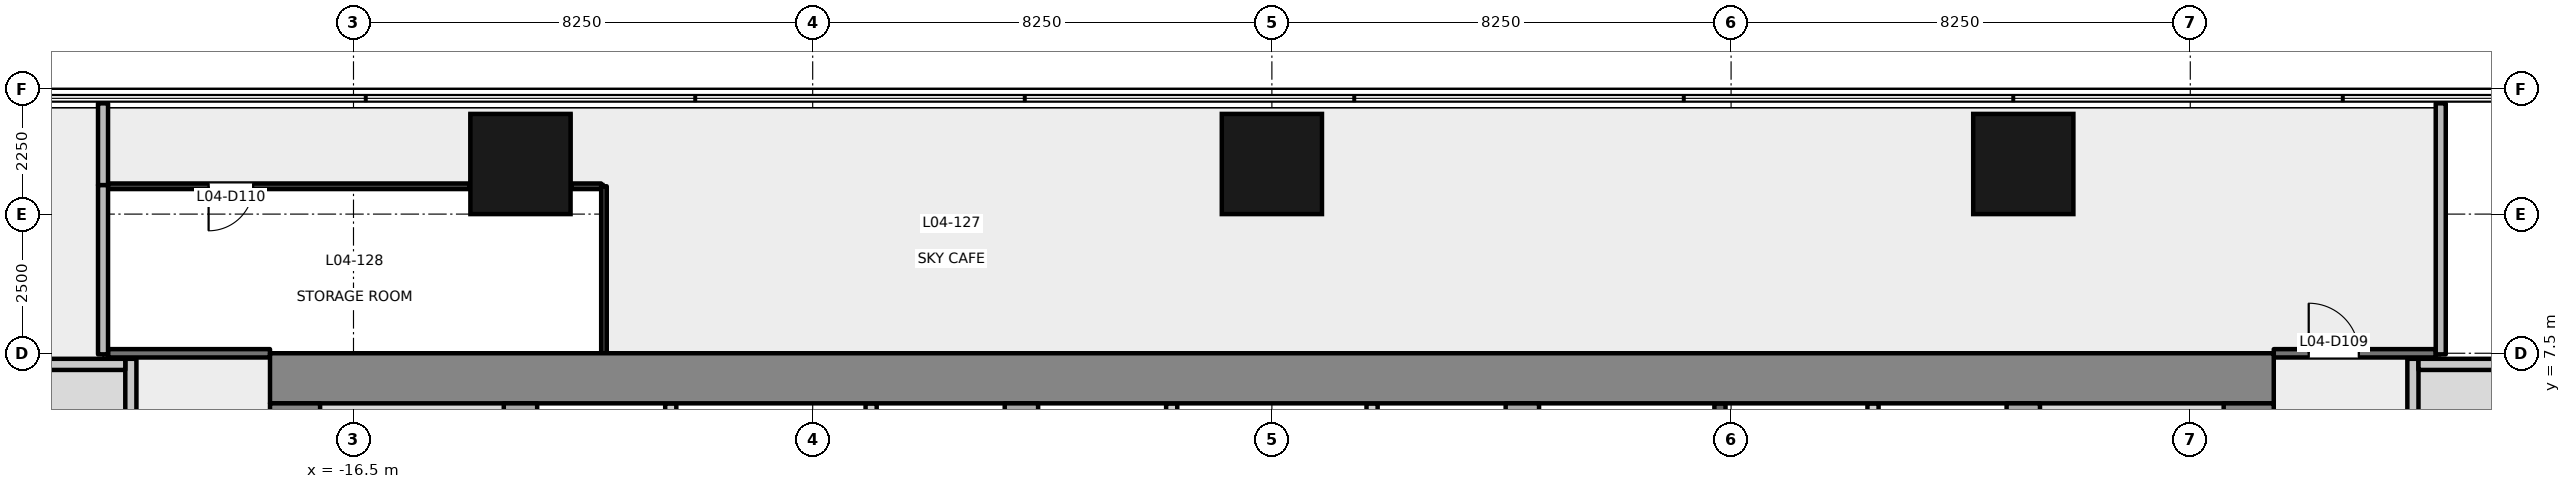
"""IFC4 building model, lengths in metres.
Left out: names, types, materials, properties, quantities, classifications, styles, units other than length and angle.
Written with IfcOpenShell. Run it as: python <this file> out.ifc"""

import sys

from ifc_helpers import new_model, si_unit, direction, frame, frame_2d, origin, origin_2d, place, context, subcontext, project, spatial, rectangle, extrude, element, fill, save


model = new_model("IFC4")
c1 = context("Model", 3, precision=1e-05, world=origin(), true_north=direction((0.0, 1.0)))
c2 = subcontext(c1, "Body", "Model", "MODEL_VIEW")
j1 = project(units=[si_unit("LENGTHUNIT", "METRE"), si_unit("PLANEANGLEUNIT", "RADIAN")], contexts=[c1])
p1 = place(None, origin())
s1 = spatial("IfcSite", under=j1, at=p1, CompositionType="ELEMENT")
p2 = place(p1, origin())
s2 = spatial("IfcBuilding", under=s1, at=p2, CompositionType="ELEMENT")
p3 = place(p2, frame((0.0, 0.0, 22.2)))
s3 = spatial("IfcBuildingStorey", under=s2, at=p3, CompositionType="ELEMENT", Elevation=22.2)
for number, where, z_axis, x_axis in (
    (1, (-13.5, 10.9, -0.2), (0.0, 0.0, 1.0), (1.0, 0.0, 0.0)),
    (2, (0.0, 10.9, -0.2), (0.0, 0.0, 1.0), (1.0, 0.0, 0.0)),
    (3, (13.5, 10.9, -0.2), (0.0, 0.0, 1.0), (1.0, 0.0, 0.0)),
):
    element("IfcColumn", number, at=place(p3, frame(where, z_axis=z_axis, x_axis=x_axis)), inside=s3, PredefinedType="COLUMN", context=c2, shape_type="SweptSolid", body=[
        extrude(rectangle(XDim=1.8, YDim=1.8, at=origin_2d()), origin(), (0.0, 0.0, 1.0), 4.8),
    ])
p4 = place(p3, frame((-18.0, 7.05, -0.2), z_axis=(0.0, 0.0, 1.0), x_axis=(1.0, 0.0, 0.0)))
e4 = element("IfcWall", 4, at=p4, inside=s3, PredefinedType="SHEAR", context=c2, shape_type="SweptSolid", body=[
    extrude(rectangle(XDim=36.0, YDim=0.9, at=frame_2d((18.0, 0.0))), origin(), (0.0, 0.0, 1.0), 4.8),
])
p5 = place(p3, frame((-17.55, -6.6, -0.2), z_axis=(0.0, 0.0, 1.0), x_axis=(0.0, 1.0, 0.0)))
e5 = element("IfcWall", 5, at=p5, inside=s3, PredefinedType="SHEAR", context=c2, shape_type="SweptSolid", body=[
    extrude(rectangle(XDim=13.2, YDim=0.9, at=frame_2d((6.6, 0.0))), origin(), (0.0, 0.0, 1.0), 4.8),
])
p6 = place(p5, frame((4.55, 0.0, 0.2)))
e6 = element("IfcOpeningElement", 6, at=p6, cuts=e5, PredefinedType="OPENING", context=c2, shape_type="SweptSolid", body=[
    extrude(rectangle(XDim=1.2, YDim=2.1, at=frame_2d((0.6, 1.05))), frame((0.0, 0.46, 0.0), z_axis=(0.0, -1.0, 0.0), x_axis=(1.0, 0.0, 0.0)), (0.0, 0.0, 1.0), 0.921),
])
p7 = place(p3, frame((17.55, -6.6, -0.2), z_axis=(0.0, 0.0, 1.0), x_axis=(0.0, 1.0, 0.0)))
e7 = element("IfcWall", 7, at=p7, inside=s3, PredefinedType="SHEAR", context=c2, shape_type="SweptSolid", body=[
    extrude(rectangle(XDim=13.2, YDim=0.9, at=frame_2d((6.6, 0.0))), origin(), (0.0, 0.0, 1.0), 4.8),
])
p8 = place(p7, frame((4.55, 0.0, 0.2)))
e8 = element("IfcOpeningElement", 8, at=p8, cuts=e7, PredefinedType="OPENING", context=c2, shape_type="SweptSolid", body=[
    extrude(rectangle(XDim=1.2, YDim=2.1, at=frame_2d((0.6, 1.05))), frame((0.0, 0.46, 0.0), z_axis=(0.0, -1.0, 0.0), x_axis=(1.0, 0.0, 0.0)), (0.0, 0.0, 1.0), 0.921),
])
for number, where, z_axis, x_axis in (
    (9, (-13.5, -6.6, -0.2), (0.0, 0.0, 1.0), (0.0, 1.0, 0.0)),
    (10, (-4.5, -6.6, -0.2), (0.0, 0.0, 1.0), (0.0, 1.0, 0.0)),
    (11, (4.5, -6.6, -0.2), (0.0, 0.0, 1.0), (0.0, 1.0, 0.0)),
    (12, (13.5, -6.6, -0.2), (0.0, 0.0, 1.0), (0.0, 1.0, 0.0)),
):
    element("IfcWall", number, at=place(p3, frame(where, z_axis=z_axis, x_axis=x_axis)), inside=s3, PredefinedType="SHEAR", context=c2, shape_type="SweptSolid", body=[
        extrude(rectangle(XDim=13.2, YDim=0.6, at=frame_2d((6.6, 0.0))), origin(), (0.0, 0.0, 1.0), 4.8),
    ])
p9 = place(p3, frame((-10.8, -6.6, 0.0), z_axis=(0.0, 0.0, 1.0), x_axis=(0.0, 1.0, 0.0)))
e13 = element("IfcWall", 13, at=p9, inside=s3, PredefinedType="PARTITIONING", context=c2, shape_type="SweptSolid", body=[
    extrude(rectangle(XDim=13.2, YDim=0.2, at=frame_2d((6.6, 0.0))), origin(), (0.0, 0.0, 1.0), 4.6),
])
p10 = place(p9, frame((0.55, 0.0, 0.0)))
e14 = element("IfcOpeningElement", 14, at=p10, cuts=e13, PredefinedType="OPENING", context=c2, shape_type="SweptSolid", body=[
    extrude(rectangle(XDim=0.9, YDim=2.1, at=frame_2d((0.45, 1.05))), frame((0.0, 0.111, 0.0), z_axis=(0.0, -1.0, 0.0), x_axis=(1.0, 0.0, 0.0)), (0.0, 0.0, 1.0), 0.221),
])
p11 = place(p9, frame((2.9, 0.0, 0.0)))
e15 = element("IfcOpeningElement", 15, at=p11, cuts=e13, PredefinedType="OPENING", context=c2, shape_type="SweptSolid", body=[
    extrude(rectangle(XDim=1.2, YDim=2.1, at=frame_2d((0.6, 1.05))), frame((0.0, 0.111, 0.0), z_axis=(0.0, -1.0, 0.0), x_axis=(1.0, 0.0, 0.0)), (0.0, 0.0, 1.0), 0.221),
])
p12 = place(p9, frame((5.7, 0.0, 0.0)))
e16 = element("IfcOpeningElement", 16, at=p12, cuts=e13, PredefinedType="OPENING", context=c2, shape_type="SweptSolid", body=[
    extrude(rectangle(XDim=1.2, YDim=2.1, at=frame_2d((0.6, 1.05))), frame((0.0, 0.111, 0.0), z_axis=(0.0, -1.0, 0.0), x_axis=(1.0, 0.0, 0.0)), (0.0, 0.0, 1.0), 0.221),
])
p13 = place(p9, frame((8.5, 0.0, 0.0)))
e17 = element("IfcOpeningElement", 17, at=p13, cuts=e13, PredefinedType="OPENING", context=c2, shape_type="SweptSolid", body=[
    extrude(rectangle(XDim=1.2, YDim=2.1, at=frame_2d((0.6, 1.05))), frame((0.0, 0.111, 0.0), z_axis=(0.0, -1.0, 0.0), x_axis=(1.0, 0.0, 0.0)), (0.0, 0.0, 1.0), 0.221),
])
p14 = place(p9, frame((11.3, 0.0, 0.0)))
e18 = element("IfcOpeningElement", 18, at=p14, cuts=e13, PredefinedType="OPENING", context=c2, shape_type="SweptSolid", body=[
    extrude(rectangle(XDim=1.2, YDim=2.1, at=frame_2d((0.6, 1.05))), frame((0.0, 0.111, 0.0), z_axis=(0.0, -1.0, 0.0), x_axis=(1.0, 0.0, 0.0)), (0.0, 0.0, 1.0), 0.221),
])
p15 = place(p3, frame((-7.2, -6.6, 0.0), z_axis=(0.0, 0.0, 1.0), x_axis=(0.0, 1.0, 0.0)))
e19 = element("IfcWall", 19, at=p15, inside=s3, PredefinedType="PARTITIONING", context=c2, shape_type="SweptSolid", body=[
    extrude(rectangle(XDim=13.2, YDim=0.2, at=frame_2d((6.6, 0.0))), origin(), (0.0, 0.0, 1.0), 4.6),
])
p16 = place(p15, frame((0.55, 0.0, 0.0)))
e20 = element("IfcOpeningElement", 20, at=p16, cuts=e19, PredefinedType="OPENING", context=c2, shape_type="SweptSolid", body=[
    extrude(rectangle(XDim=0.9, YDim=2.1, at=frame_2d((0.45, 1.05))), frame((0.0, 0.111, 0.0), z_axis=(0.0, -1.0, 0.0), x_axis=(1.0, 0.0, 0.0)), (0.0, 0.0, 1.0), 0.221),
])
p17 = place(p15, frame((2.9, 0.0, 0.0)))
e21 = element("IfcOpeningElement", 21, at=p17, cuts=e19, PredefinedType="OPENING", context=c2, shape_type="SweptSolid", body=[
    extrude(rectangle(XDim=1.2, YDim=2.1, at=frame_2d((0.6, 1.05))), frame((0.0, 0.111, 0.0), z_axis=(0.0, -1.0, 0.0), x_axis=(1.0, 0.0, 0.0)), (0.0, 0.0, 1.0), 0.221),
])
p18 = place(p15, frame((5.7, 0.0, 0.0)))
e22 = element("IfcOpeningElement", 22, at=p18, cuts=e19, PredefinedType="OPENING", context=c2, shape_type="SweptSolid", body=[
    extrude(rectangle(XDim=1.2, YDim=2.1, at=frame_2d((0.6, 1.05))), frame((0.0, 0.111, 0.0), z_axis=(0.0, -1.0, 0.0), x_axis=(1.0, 0.0, 0.0)), (0.0, 0.0, 1.0), 0.221),
])
p19 = place(p15, frame((8.5, 0.0, 0.0)))
e23 = element("IfcOpeningElement", 23, at=p19, cuts=e19, PredefinedType="OPENING", context=c2, shape_type="SweptSolid", body=[
    extrude(rectangle(XDim=1.2, YDim=2.1, at=frame_2d((0.6, 1.05))), frame((0.0, 0.111, 0.0), z_axis=(0.0, -1.0, 0.0), x_axis=(1.0, 0.0, 0.0)), (0.0, 0.0, 1.0), 0.221),
])
p20 = place(p15, frame((11.3, 0.0, 0.0)))
e24 = element("IfcOpeningElement", 24, at=p20, cuts=e19, PredefinedType="OPENING", context=c2, shape_type="SweptSolid", body=[
    extrude(rectangle(XDim=1.2, YDim=2.1, at=frame_2d((0.6, 1.05))), frame((0.0, 0.111, 0.0), z_axis=(0.0, -1.0, 0.0), x_axis=(1.0, 0.0, 0.0)), (0.0, 0.0, 1.0), 0.221),
])
p21 = place(p3, frame((-1.8, -6.6, 0.0), z_axis=(0.0, 0.0, 1.0), x_axis=(0.0, 1.0, 0.0)))
e25 = element("IfcWall", 25, at=p21, inside=s3, PredefinedType="PARTITIONING", context=c2, shape_type="SweptSolid", body=[
    extrude(rectangle(XDim=13.2, YDim=0.2, at=frame_2d((6.6, 0.0))), origin(), (0.0, 0.0, 1.0), 4.6),
])
p22 = place(p21, frame((0.55, 0.0, 0.0)))
e26 = element("IfcOpeningElement", 26, at=p22, cuts=e25, PredefinedType="OPENING", context=c2, shape_type="SweptSolid", body=[
    extrude(rectangle(XDim=0.9, YDim=2.1, at=frame_2d((0.45, 1.05))), frame((0.0, 0.111, 0.0), z_axis=(0.0, -1.0, 0.0), x_axis=(1.0, 0.0, 0.0)), (0.0, 0.0, 1.0), 0.221),
])
p23 = place(p3, frame((1.8, -6.6, 0.0), z_axis=(0.0, 0.0, 1.0), x_axis=(0.0, 1.0, 0.0)))
e27 = element("IfcWall", 27, at=p23, inside=s3, PredefinedType="PARTITIONING", context=c2, shape_type="SweptSolid", body=[
    extrude(rectangle(XDim=13.2, YDim=0.2, at=frame_2d((6.6, 0.0))), origin(), (0.0, 0.0, 1.0), 4.6),
])
p24 = place(p23, frame((0.55, 0.0, 0.0)))
e28 = element("IfcOpeningElement", 28, at=p24, cuts=e27, PredefinedType="OPENING", context=c2, shape_type="SweptSolid", body=[
    extrude(rectangle(XDim=0.9, YDim=2.1, at=frame_2d((0.45, 1.05))), frame((0.0, 0.111, 0.0), z_axis=(0.0, -1.0, 0.0), x_axis=(1.0, 0.0, 0.0)), (0.0, 0.0, 1.0), 0.221),
])
p25 = place(p3, frame((8.05, -6.6, 0.0), z_axis=(0.0, 0.0, 1.0), x_axis=(0.0, 1.0, 0.0)))
e29 = element("IfcWall", 29, at=p25, inside=s3, PredefinedType="PARTITIONING", context=c2, shape_type="SweptSolid", body=[
    extrude(rectangle(XDim=13.2, YDim=0.2, at=frame_2d((6.6, 0.0))), origin(), (0.0, 0.0, 1.0), 4.6),
])
p26 = place(p25, frame((0.298, 0.0, 0.0)))
e30 = element("IfcOpeningElement", 30, at=p26, cuts=e29, PredefinedType="OPENING", context=c2, shape_type="SweptSolid", body=[
    extrude(rectangle(XDim=0.9, YDim=2.1, at=frame_2d((0.45, 1.05))), frame((0.0, 0.111, 0.0), z_axis=(0.0, -1.0, 0.0), x_axis=(1.0, 0.0, 0.0)), (0.0, 0.0, 1.0), 0.221),
])
p27 = place(p25, frame((2.066, 0.0, 0.0)))
e31 = element("IfcOpeningElement", 31, at=p27, cuts=e29, PredefinedType="OPENING", context=c2, shape_type="SweptSolid", body=[
    extrude(rectangle(XDim=0.9, YDim=2.1, at=frame_2d((0.45, 1.05))), frame((0.0, 0.111, 0.0), z_axis=(0.0, -1.0, 0.0), x_axis=(1.0, 0.0, 0.0)), (0.0, 0.0, 1.0), 0.221),
])
p28 = place(p25, frame((3.834, 0.0, 0.0)))
e32 = element("IfcOpeningElement", 32, at=p28, cuts=e29, PredefinedType="OPENING", context=c2, shape_type="SweptSolid", body=[
    extrude(rectangle(XDim=0.9, YDim=2.1, at=frame_2d((0.45, 1.05))), frame((0.0, 0.111, 0.0), z_axis=(0.0, -1.0, 0.0), x_axis=(1.0, 0.0, 0.0)), (0.0, 0.0, 1.0), 0.221),
])
p29 = place(p25, frame((5.466, 0.0, 0.0)))
e33 = element("IfcOpeningElement", 33, at=p29, cuts=e29, PredefinedType="OPENING", context=c2, shape_type="SweptSolid", body=[
    extrude(rectangle(XDim=0.9, YDim=2.1, at=frame_2d((0.45, 1.05))), frame((0.0, 0.111, 0.0), z_axis=(0.0, -1.0, 0.0), x_axis=(1.0, 0.0, 0.0)), (0.0, 0.0, 1.0), 0.221),
])
p30 = place(p25, frame((11.9, 0.0, 0.0)))
e34 = element("IfcOpeningElement", 34, at=p30, cuts=e29, PredefinedType="OPENING", context=c2, shape_type="SweptSolid", body=[
    extrude(rectangle(XDim=1.1, YDim=2.1, at=frame_2d((0.55, 1.05))), frame((0.0, 0.111, 0.0), z_axis=(0.0, -1.0, 0.0), x_axis=(1.0, 0.0, 0.0)), (0.0, 0.0, 1.0), 0.221),
])
p31 = place(p3, frame((10.8, -6.6, 0.0), z_axis=(0.0, 0.0, 1.0), x_axis=(0.0, 1.0, 0.0)))
e35 = element("IfcWall", 35, at=p31, inside=s3, PredefinedType="PARTITIONING", context=c2, shape_type="SweptSolid", body=[
    extrude(rectangle(XDim=13.2, YDim=0.2, at=frame_2d((6.6, 0.0))), origin(), (0.0, 0.0, 1.0), 4.6),
])
p32 = place(p31, frame((0.7, 0.0, 0.0)))
e36 = element("IfcOpeningElement", 36, at=p32, cuts=e35, PredefinedType="OPENING", context=c2, shape_type="SweptSolid", body=[
    extrude(rectangle(XDim=1.2, YDim=2.1, at=frame_2d((0.6, 1.05))), frame((0.0, 0.111, 0.0), z_axis=(0.0, -1.0, 0.0), x_axis=(1.0, 0.0, 0.0)), (0.0, 0.0, 1.0), 0.221),
])
p33 = place(p31, frame((8.67, 0.0, 0.0)))
e37 = element("IfcOpeningElement", 37, at=p33, cuts=e35, PredefinedType="OPENING", context=c2, shape_type="SweptSolid", body=[
    extrude(rectangle(XDim=0.9, YDim=2.1, at=frame_2d((0.45, 1.05))), frame((0.0, 0.111, 0.0), z_axis=(0.0, -1.0, 0.0), x_axis=(1.0, 0.0, 0.0)), (0.0, 0.0, 1.0), 0.221),
])
p34 = place(p31, frame((10.11, 0.0, 0.0)))
e38 = element("IfcOpeningElement", 38, at=p34, cuts=e35, PredefinedType="OPENING", context=c2, shape_type="SweptSolid", body=[
    extrude(rectangle(XDim=0.9, YDim=2.1, at=frame_2d((0.45, 1.05))), frame((0.0, 0.111, 0.0), z_axis=(0.0, -1.0, 0.0), x_axis=(1.0, 0.0, 0.0)), (0.0, 0.0, 1.0), 0.221),
])
p35 = place(p31, frame((11.79, 0.0, 0.0)))
e39 = element("IfcOpeningElement", 39, at=p35, cuts=e35, PredefinedType="OPENING", context=c2, shape_type="SweptSolid", body=[
    extrude(rectangle(XDim=0.9, YDim=2.1, at=frame_2d((0.45, 1.05))), frame((0.0, 0.111, 0.0), z_axis=(0.0, -1.0, 0.0), x_axis=(1.0, 0.0, 0.0)), (0.0, 0.0, 1.0), 0.221),
])
p36 = place(p3, frame((-20.5, 7.4, -0.2), z_axis=(0.0, 0.0, 1.0), x_axis=(0.0, -1.0, 0.0)))
e40 = element("IfcWall", 40, at=p36, inside=s3, PredefinedType="SHEAR", context=c2, shape_type="SweptSolid", body=[
    extrude(rectangle(XDim=7.4, YDim=0.2, at=frame_2d((3.7, 0.0))), origin(), (0.0, 0.0, 1.0), 4.8),
])
p37 = place(p36, frame((5.375, 0.0, 0.2)))
e41 = element("IfcOpeningElement", 41, at=p37, cuts=e40, PredefinedType="OPENING", context=c2, shape_type="SweptSolid", body=[
    extrude(rectangle(XDim=1.8, YDim=2.1, at=frame_2d((0.9, 1.05))), frame((0.0, 0.111, 0.0), z_axis=(0.0, -1.0, 0.0), x_axis=(1.0, 0.0, 0.0)), (0.0, 0.0, 1.0), 0.221),
])
p38 = place(p3, frame((-25.1, 7.3, -0.2), z_axis=(0.0, 0.0, 1.0), x_axis=(1.0, 0.0, 0.0)))
e42 = element("IfcWall", 42, at=p38, inside=s3, PredefinedType="SHEAR", context=c2, shape_type="SweptSolid", body=[
    extrude(rectangle(XDim=4.5, YDim=0.2, at=frame_2d((2.25, 0.0))), origin(), (0.0, 0.0, 1.0), 4.8),
])
p39 = place(p3, frame((20.5, 0.0, -0.2), z_axis=(0.0, 0.0, 1.0), x_axis=(0.0, 1.0, 0.0)))
e43 = element("IfcWall", 43, at=p39, inside=s3, PredefinedType="SHEAR", context=c2, shape_type="SweptSolid", body=[
    extrude(rectangle(XDim=7.4, YDim=0.2, at=frame_2d((3.7, 0.0))), origin(), (0.0, 0.0, 1.0), 4.8),
])
p40 = place(p39, frame((0.225, 0.0, 0.2)))
e44 = element("IfcOpeningElement", 44, at=p40, cuts=e43, PredefinedType="OPENING", context=c2, shape_type="SweptSolid", body=[
    extrude(rectangle(XDim=1.8, YDim=2.1, at=frame_2d((0.9, 1.05))), frame((0.0, 0.111, 0.0), z_axis=(0.0, -1.0, 0.0), x_axis=(1.0, 0.0, 0.0)), (0.0, 0.0, 1.0), 0.221),
])
p41 = place(p3, frame((20.6, 7.3, -0.2), z_axis=(0.0, 0.0, 1.0), x_axis=(1.0, 0.0, 0.0)))
e45 = element("IfcWall", 45, at=p41, inside=s3, PredefinedType="SHEAR", context=c2, shape_type="SweptSolid", body=[
    extrude(rectangle(XDim=4.5, YDim=0.2, at=frame_2d((2.25, 0.0))), origin(), (0.0, 0.0, 1.0), 4.8),
])
p42 = place(p3, frame((18.0, 7.499, 0.0), z_axis=(0.0, 0.0, 1.0), x_axis=(1.0, 0.0, 0.0)))
e46 = element("IfcWall", 46, at=p42, inside=s3, PredefinedType="PARTITIONING", context=c2, shape_type="SweptSolid", body=[
    extrude(rectangle(XDim=2.91, YDim=0.15, at=frame_2d((1.455, 0.0))), origin(), (0.0, 0.0, 1.0), 4.6),
])
p43 = place(p42, frame((0.628, 0.0, 0.0)))
e47 = element("IfcOpeningElement", 47, at=p43, cuts=e46, PredefinedType="OPENING", context=c2, shape_type="SweptSolid", body=[
    extrude(rectangle(XDim=0.9, YDim=2.1, at=frame_2d((0.45, 1.05))), frame((0.0, 0.085, 0.0), z_axis=(0.0, -1.0, 0.0), x_axis=(1.0, 0.0, 0.0)), (0.0, 0.0, 1.0), 0.171),
])
p44 = place(p3, frame((-20.91, 7.499, 0.0), z_axis=(0.0, 0.0, 1.0), x_axis=(1.0, 0.0, 0.0)))
e48 = element("IfcWall", 48, at=p44, inside=s3, PredefinedType="PARTITIONING", context=c2, shape_type="SweptSolid", body=[
    extrude(rectangle(XDim=2.91, YDim=0.15, at=frame_2d((1.455, 0.0))), origin(), (0.0, 0.0, 1.0), 4.6),
])
p45 = place(p3, frame((-21.0, 11.99, 0.0), z_axis=(0.0, 0.0, 1.0), x_axis=(0.0, -1.0, 0.0)))
e49 = element("IfcWall", 49, at=p45, inside=s3, PredefinedType="PARTITIONING", context=c2, shape_type="SweptSolid", body=[
    extrude(rectangle(XDim=1.47, YDim=0.18, at=frame_2d((0.735, 0.0))), origin(), (0.0, 0.0, 1.0), 4.6),
])
p46 = place(p3, frame((-21.0, 10.52, 0.0), z_axis=(0.0, 0.0, 1.0), x_axis=(0.0, -1.0, 0.0)))
e50 = element("IfcWall", 50, at=p46, inside=s3, PredefinedType="PARTITIONING", context=c2, shape_type="SweptSolid", body=[
    extrude(rectangle(XDim=3.04, YDim=0.18, at=frame_2d((1.52, 0.0))), origin(), (0.0, 0.0, 1.0), 3.5),
])
p47 = place(p3, frame((21.0, 7.48, 0.0), z_axis=(0.0, 0.0, 1.0), x_axis=(0.0, 1.0, 0.0)))
e51 = element("IfcWall", 51, at=p47, inside=s3, PredefinedType="PARTITIONING", context=c2, shape_type="SweptSolid", body=[
    extrude(rectangle(XDim=4.51, YDim=0.18, at=frame_2d((2.255, 0.0))), origin(), (0.0, 0.0, 1.0), 3.5),
])
p48 = place(p3, frame((-14.42, 10.5, 0.0), z_axis=(0.0, 0.0, 1.0), x_axis=(-1.0, 0.0, 0.0)))
e52 = element("IfcWall", 52, at=p48, inside=s3, PredefinedType="PARTITIONING", context=c2, shape_type="SweptSolid", body=[
    extrude(rectangle(XDim=6.49, YDim=0.1, at=frame_2d((3.245, 0.0))), origin(), (0.0, 0.0, 1.0), 4.6),
])
p49 = place(p48, frame((3.883, 0.0, 0.0)))
e53 = element("IfcOpeningElement", 53, at=p49, cuts=e52, PredefinedType="OPENING", context=c2, shape_type="SweptSolid", body=[
    extrude(rectangle(XDim=0.8, YDim=2.1, at=frame_2d((0.4, 1.05))), frame((0.0, 0.061, 0.0), z_axis=(0.0, -1.0, 0.0), x_axis=(1.0, 0.0, 0.0)), (0.0, 0.0, 1.0), 0.121),
])
p50 = place(p3, frame((-12.05, 10.5, 0.0), z_axis=(0.0, 0.0, 1.0), x_axis=(-1.0, 0.0, 0.0)))
e54 = element("IfcWall", 54, at=p50, inside=s3, PredefinedType="PARTITIONING", context=c2, shape_type="SweptSolid", body=[
    extrude(rectangle(XDim=0.53, YDim=0.1, at=frame_2d((0.265, 0.0))), origin(), (0.0, 0.0, 1.0), 4.6),
])
p51 = place(p3, frame((-12.0, 7.5, 0.0), z_axis=(0.0, 0.0, 1.0), x_axis=(0.0, 1.0, 0.0)))
e55 = element("IfcWall", 55, at=p51, inside=s3, PredefinedType="PARTITIONING", context=c2, shape_type="SweptSolid", body=[
    extrude(rectangle(XDim=3.0, YDim=0.1, at=frame_2d((1.5, 0.0))), origin(), (0.0, 0.0, 1.0), 3.5),
])
p52 = place(p43, origin())
e56 = element("IfcDoor", 56, at=p52, inside=s3, OperationType="SINGLE_SWING_LEFT", PredefinedType="DOOR", context=c2, shape_type="SweptSolid", body=[
    extrude(rectangle(XDim=0.9, YDim=2.1, at=frame_2d((0.45, 1.05))), frame((0.0, 0.025, 0.0), z_axis=(0.0, -1.0, 0.0), x_axis=(1.0, 0.0, 0.0)), (0.0, 0.0, 1.0), 0.05),
])
fill(e47, e56)
p53 = place(p49, origin())
e57 = element("IfcDoor", 57, at=p53, inside=s3, OperationType="SINGLE_SWING_RIGHT", PredefinedType="DOOR", context=c2, shape_type="SweptSolid", body=[
    extrude(rectangle(XDim=0.8, YDim=2.1, at=frame_2d((0.4, 1.05))), frame((0.0, 0.025, 0.0), z_axis=(0.0, -1.0, 0.0), x_axis=(1.0, 0.0, 0.0)), (0.0, 0.0, 1.0), 0.05),
])
fill(e53, e57)
save(model, sys.argv[1])
